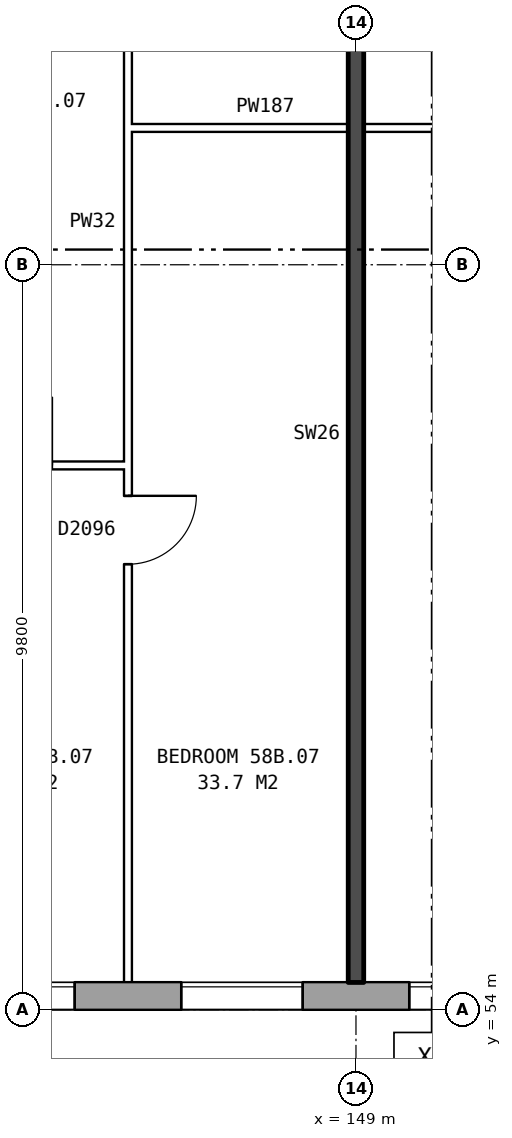
"""IFC4 building model, lengths in metres.
Left out: names, types, materials, properties, quantities, classifications, styles, units other than length and angle.
Written with IfcOpenShell. Run it as: python <this file> out.ifc"""

import sys

from ifc_helpers import new_model, si_unit, direction, frame, frame_2d, origin, place, context, subcontext, project, spatial, rectangle, extrude, element, fill, save


model = new_model("IFC4")
c1 = context("Model", 3, precision=1e-05, world=origin(), true_north=direction((0.0, 1.0)))
c2 = subcontext(c1, "Body", "Model", "MODEL_VIEW")
j1 = project(units=[si_unit("LENGTHUNIT", "METRE"), si_unit("PLANEANGLEUNIT", "RADIAN")], contexts=[c1])
p1 = place(None, origin())
s1 = spatial("IfcSite", under=j1, at=p1, CompositionType="ELEMENT")
p2 = place(p1, origin())
s2 = spatial("IfcBuilding", under=s1, at=p2, CompositionType="ELEMENT")
p3 = place(p2, frame((0.0, 0.0, 205.9)))
s3 = spatial("IfcBuildingStorey", under=s2, at=p3, CompositionType="ELEMENT", Elevation=205.9)
p4 = place(p3, frame((132.05, 54.18, 0.0), z_axis=(0.0, 0.0, 1.0), x_axis=(1.0, 0.0, 0.0)))
e1 = element("IfcWall", 1, at=p4, inside=s3, PredefinedType="STANDARD", context=c2, shape_type="SweptSolid", body=[
    extrude(rectangle(XDim=33.875, YDim=0.36, at=frame_2d((16.938, 0.0))), origin(), (0.0, 0.0, 1.0), 2.85),
])
p5 = place(p4, frame((0.3, 0.0, 0.9)))
e2 = element("IfcOpeningElement", 2, at=p5, cuts=e1, PredefinedType="OPENING", context=c2, shape_type="SweptSolid", body=[
    extrude(rectangle(XDim=0.8, YDim=1.5, at=frame_2d((0.4, 0.75))), frame((0.0, 0.19, 0.0), z_axis=(0.0, -1.0, 0.0), x_axis=(1.0, 0.0, 0.0)), (0.0, 0.0, 1.0), 0.38),
])
p6 = place(p4, frame((5.65, 0.0, 0.8)))
e3 = element("IfcOpeningElement", 3, at=p6, cuts=e1, PredefinedType="OPENING", context=c2, shape_type="SweptSolid", body=[
    extrude(rectangle(XDim=1.6, YDim=1.8, at=frame_2d((0.8, 0.9))), frame((0.0, 0.19, 0.0), z_axis=(0.0, -1.0, 0.0), x_axis=(1.0, 0.0, 0.0)), (0.0, 0.0, 1.0), 0.38),
])
p7 = place(p4, frame((8.65, 0.0, 0.8)))
e4 = element("IfcOpeningElement", 4, at=p7, cuts=e1, PredefinedType="OPENING", context=c2, shape_type="SweptSolid", body=[
    extrude(rectangle(XDim=1.6, YDim=1.8, at=frame_2d((0.8, 0.9))), frame((0.0, 0.19, 0.0), z_axis=(0.0, -1.0, 0.0), x_axis=(1.0, 0.0, 0.0)), (0.0, 0.0, 1.0), 0.38),
])
p8 = place(p4, frame((11.65, 0.0, 0.8)))
e5 = element("IfcOpeningElement", 5, at=p8, cuts=e1, PredefinedType="OPENING", context=c2, shape_type="SweptSolid", body=[
    extrude(rectangle(XDim=1.6, YDim=1.8, at=frame_2d((0.8, 0.9))), frame((0.0, 0.19, 0.0), z_axis=(0.0, -1.0, 0.0), x_axis=(1.0, 0.0, 0.0)), (0.0, 0.0, 1.0), 0.38),
])
p9 = place(p4, frame((14.65, 0.0, 0.8)))
e6 = element("IfcOpeningElement", 6, at=p9, cuts=e1, PredefinedType="OPENING", context=c2, shape_type="SweptSolid", body=[
    extrude(rectangle(XDim=1.6, YDim=1.8, at=frame_2d((0.8, 0.9))), frame((0.0, 0.19, 0.0), z_axis=(0.0, -1.0, 0.0), x_axis=(1.0, 0.0, 0.0)), (0.0, 0.0, 1.0), 0.38),
])
p10 = place(p4, frame((17.65, 0.0, 0.8)))
e7 = element("IfcOpeningElement", 7, at=p10, cuts=e1, PredefinedType="OPENING", context=c2, shape_type="SweptSolid", body=[
    extrude(rectangle(XDim=1.6, YDim=1.8, at=frame_2d((0.8, 0.9))), frame((0.0, 0.19, 0.0), z_axis=(0.0, -1.0, 0.0), x_axis=(1.0, 0.0, 0.0)), (0.0, 0.0, 1.0), 0.38),
])
p11 = place(p4, frame((20.65, 0.0, 0.8)))
e8 = element("IfcOpeningElement", 8, at=p11, cuts=e1, PredefinedType="OPENING", context=c2, shape_type="SweptSolid", body=[
    extrude(rectangle(XDim=1.6, YDim=1.8, at=frame_2d((0.8, 0.9))), frame((0.0, 0.19, 0.0), z_axis=(0.0, -1.0, 0.0), x_axis=(1.0, 0.0, 0.0)), (0.0, 0.0, 1.0), 0.38),
])
p12 = place(p4, frame((23.65, 0.0, 0.8)))
e9 = element("IfcOpeningElement", 9, at=p12, cuts=e1, PredefinedType="OPENING", context=c2, shape_type="SweptSolid", body=[
    extrude(rectangle(XDim=1.6, YDim=1.8, at=frame_2d((0.8, 0.9))), frame((0.0, 0.19, 0.0), z_axis=(0.0, -1.0, 0.0), x_axis=(1.0, 0.0, 0.0)), (0.0, 0.0, 1.0), 0.38),
])
p13 = place(p4, frame((26.65, 0.0, 0.8)))
e10 = element("IfcOpeningElement", 10, at=p13, cuts=e1, PredefinedType="OPENING", context=c2, shape_type="SweptSolid", body=[
    extrude(rectangle(XDim=1.6, YDim=1.8, at=frame_2d((0.8, 0.9))), frame((0.0, 0.19, 0.0), z_axis=(0.0, -1.0, 0.0), x_axis=(1.0, 0.0, 0.0)), (0.0, 0.0, 1.0), 0.38),
])
p14 = place(p4, frame((29.65, 0.0, 0.8)))
e11 = element("IfcOpeningElement", 11, at=p14, cuts=e1, PredefinedType="OPENING", context=c2, shape_type="SweptSolid", body=[
    extrude(rectangle(XDim=1.6, YDim=1.8, at=frame_2d((0.8, 0.9))), frame((0.0, 0.19, 0.0), z_axis=(0.0, -1.0, 0.0), x_axis=(1.0, 0.0, 0.0)), (0.0, 0.0, 1.0), 0.38),
])
p15 = place(p4, frame((3.2, 0.0, 0.8)))
e12 = element("IfcOpeningElement", 12, at=p15, cuts=e1, PredefinedType="OPENING", context=c2, shape_type="SweptSolid", body=[
    extrude(rectangle(XDim=1.4, YDim=1.8, at=frame_2d((0.7, 0.9))), frame((0.0, 0.19, 0.0), z_axis=(0.0, -1.0, 0.0), x_axis=(1.0, 0.0, 0.0)), (0.0, 0.0, 1.0), 0.38),
])
p16 = place(p3, frame((143.1, 61.16, 0.0), z_axis=(0.0, 0.0, 1.0), x_axis=(1.0, 0.0, 0.0)))
e13 = element("IfcWall", 13, at=p16, inside=s3, PredefinedType="PARTITIONING", context=c2, shape_type="SweptSolid", body=[
    extrude(rectangle(XDim=2.9, YDim=0.1, at=frame_2d((1.45, 0.0))), origin(), (0.0, 0.0, 1.0), 2.85),
])
p17 = place(p16, frame((1.0, 0.0, 0.0)))
e14 = element("IfcOpeningElement", 14, at=p17, cuts=e13, PredefinedType="OPENING", context=c2, shape_type="SweptSolid", body=[
    extrude(rectangle(XDim=0.9, YDim=2.1, at=frame_2d((0.45, 1.05))), frame((0.0, 0.06, 0.0), z_axis=(0.0, -1.0, 0.0), x_axis=(1.0, 0.0, 0.0)), (0.0, 0.0, 1.0), 0.12),
])
p18 = place(p3, frame((146.0, 65.6, 0.0), z_axis=(0.0, 0.0, 1.0), x_axis=(1.0, 0.0, 0.0)))
e15 = element("IfcWall", 15, at=p18, inside=s3, PredefinedType="PARTITIONING", context=c2, shape_type="SweptSolid", body=[
    extrude(rectangle(XDim=6.0, YDim=0.1, at=frame_2d((3.0, 0.0))), origin(), (0.0, 0.0, 1.0), 2.85),
])
p19 = place(p3, frame((146.0, 54.36, 0.0), z_axis=(0.0, 0.0, 1.0), x_axis=(0.0, 1.0, 0.0)))
e16 = element("IfcWall", 16, at=p19, inside=s3, PredefinedType="PARTITIONING", context=c2, shape_type="SweptSolid", body=[
    extrude(rectangle(XDim=14.34, YDim=0.1, at=frame_2d((7.17, 0.0))), origin(), (0.0, 0.0, 1.0), 2.85),
])
p20 = place(p19, frame((5.5, 0.0, 0.0)))
e17 = element("IfcOpeningElement", 17, at=p20, cuts=e16, PredefinedType="OPENING", context=c2, shape_type="SweptSolid", body=[
    extrude(rectangle(XDim=0.9, YDim=2.1, at=frame_2d((0.45, 1.05))), frame((0.0, 0.06, 0.0), z_axis=(0.0, -1.0, 0.0), x_axis=(1.0, 0.0, 0.0)), (0.0, 0.0, 1.0), 0.12),
])
p21 = place(p19, frame((13.04, 0.0, 0.0)))
e18 = element("IfcOpeningElement", 18, at=p21, cuts=e16, PredefinedType="OPENING", context=c2, shape_type="SweptSolid", body=[
    extrude(rectangle(XDim=0.9, YDim=2.1, at=frame_2d((0.45, 1.05))), frame((0.0, 0.06, 0.0), z_axis=(0.0, -1.0, 0.0), x_axis=(1.0, 0.0, 0.0)), (0.0, 0.0, 1.0), 0.12),
])
p22 = place(p3, frame((149.0, 54.36, 0.0), z_axis=(0.0, 0.0, 1.0), x_axis=(0.0, 1.0, 0.0)))
e19 = element("IfcWall", 19, at=p22, inside=s3, PredefinedType="SOLIDWALL", context=c2, shape_type="SweptSolid", body=[
    extrude(rectangle(XDim=14.44, YDim=0.2, at=frame_2d((7.22, 0.0))), origin(), (0.0, 0.0, 1.0), 2.85),
])
p23 = place(p8, origin())
e20 = element("IfcWindow", 20, at=p23, inside=s3, PartitioningType="SINGLE_PANEL", PredefinedType="WINDOW", context=c2, shape_type="SweptSolid", body=[
    extrude(rectangle(XDim=1.6, YDim=1.8, at=frame_2d((0.8, 0.9))), frame((0.0, 0.15, 0.0), z_axis=(0.0, -1.0, 0.0), x_axis=(1.0, 0.0, 0.0)), (0.0, 0.0, 1.0), 0.06),
])
fill(e5, e20)
p24 = place(p9, origin())
e21 = element("IfcWindow", 21, at=p24, inside=s3, PartitioningType="SINGLE_PANEL", PredefinedType="WINDOW", context=c2, shape_type="SweptSolid", body=[
    extrude(rectangle(XDim=1.6, YDim=1.8, at=frame_2d((0.8, 0.9))), frame((0.0, 0.15, 0.0), z_axis=(0.0, -1.0, 0.0), x_axis=(1.0, 0.0, 0.0)), (0.0, 0.0, 1.0), 0.06),
])
fill(e6, e21)
p25 = place(p10, origin())
e22 = element("IfcWindow", 22, at=p25, inside=s3, PartitioningType="SINGLE_PANEL", PredefinedType="WINDOW", context=c2, shape_type="SweptSolid", body=[
    extrude(rectangle(XDim=1.6, YDim=1.8, at=frame_2d((0.8, 0.9))), frame((0.0, 0.15, 0.0), z_axis=(0.0, -1.0, 0.0), x_axis=(1.0, 0.0, 0.0)), (0.0, 0.0, 1.0), 0.06),
])
fill(e7, e22)
p26 = place(p20, frame((0.9, 0.0, 0.0), z_axis=(0.0, 0.0, 1.0), x_axis=(-1.0, 0.0, 0.0)))
e23 = element("IfcDoor", 23, at=p26, inside=s3, OperationType="SINGLE_SWING_LEFT", PredefinedType="DOOR", context=c2, shape_type="SweptSolid", body=[
    extrude(rectangle(XDim=0.9, YDim=2.1, at=frame_2d((0.45, 1.05))), frame((0.0, 0.025, 0.0), z_axis=(0.0, -1.0, 0.0), x_axis=(1.0, 0.0, 0.0)), (0.0, 0.0, 1.0), 0.05),
])
fill(e17, e23)
save(model, sys.argv[1])
